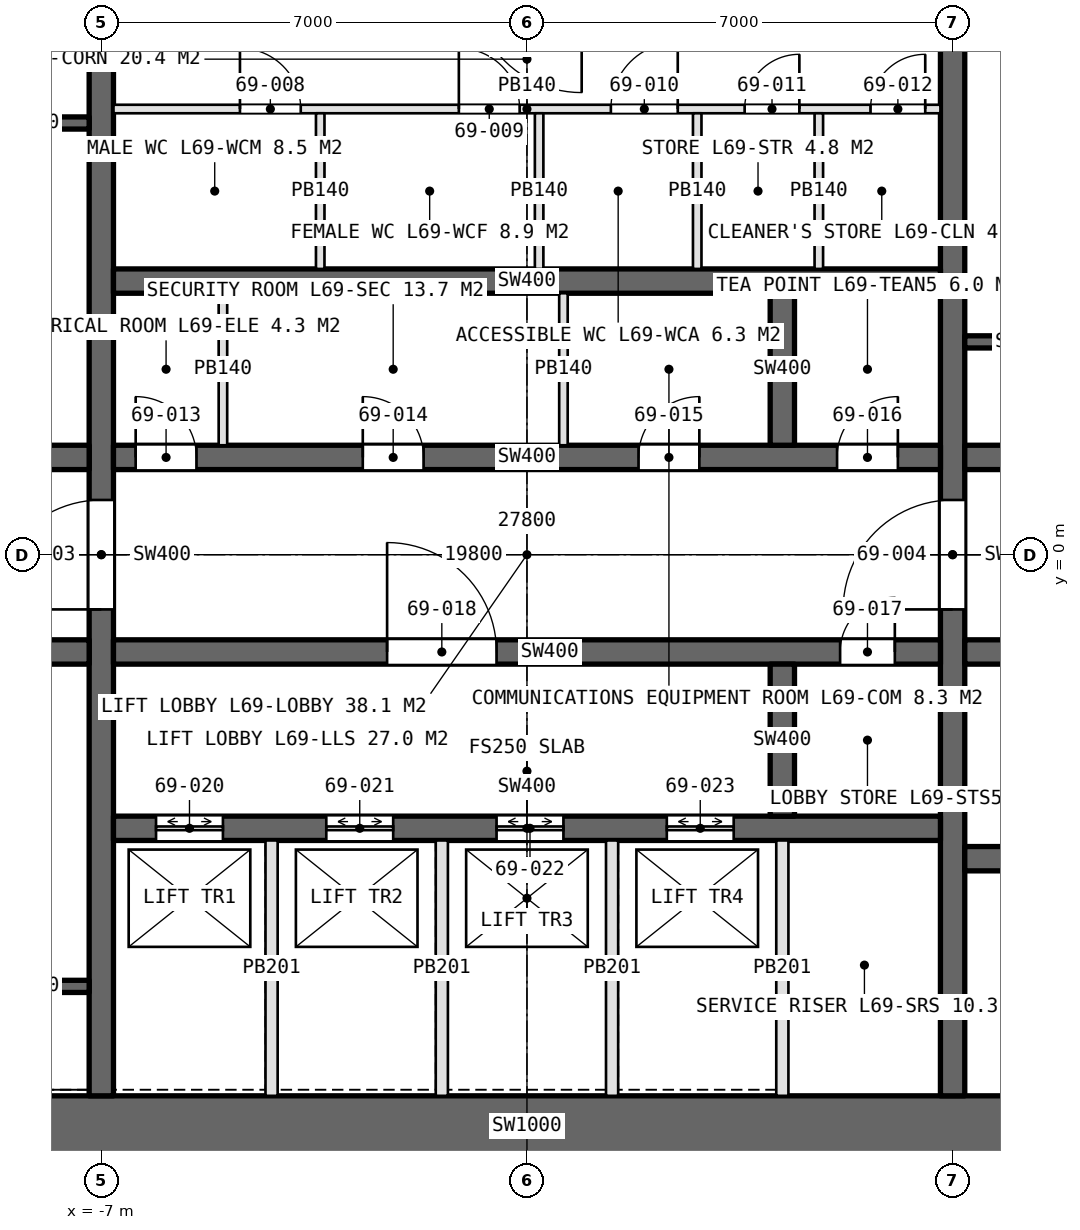
"""IFC4 building model, lengths in metres.
Left out: names, types, materials, properties, quantities, classifications, styles, units other than length and angle.
Written with IfcOpenShell. Run it as: python <this file> out.ifc"""

import sys

from ifc_helpers import new_model, si_unit, direction, frame, frame_2d, origin, place, context, subcontext, project, spatial, rectangle, extrude, element, fill, save


model = new_model("IFC4")
c1 = context("Model", 3, precision=1e-05, world=origin(), true_north=direction((0.0, 1.0)))
c2 = subcontext(c1, "Body", "Model", "MODEL_VIEW")
j1 = project(units=[si_unit("LENGTHUNIT", "METRE"), si_unit("PLANEANGLEUNIT", "RADIAN")], contexts=[c1])
p1 = place(None, origin())
s1 = spatial("IfcSite", under=j1, at=p1, CompositionType="ELEMENT")
p2 = place(p1, origin())
s2 = spatial("IfcBuilding", under=s1, at=p2, CompositionType="ELEMENT")
p3 = place(p2, frame((0.0, 0.0, 309.0)))
s3 = spatial("IfcBuildingStorey", under=s2, at=p3, CompositionType="ELEMENT", Elevation=309.0)
p4 = place(p3, frame((-13.9, -9.4, 0.0), z_axis=(0.0, 0.0, 1.0), x_axis=(1.0, 0.0, 0.0)))
e1 = element("IfcWall", 1, at=p4, inside=s3, PredefinedType="SHEAR", context=c2, shape_type="SweptSolid", body=[
    extrude(rectangle(XDim=27.8, YDim=1.0, at=frame_2d((13.9, 0.0))), origin(), (0.0, 0.0, 1.0), 4.2),
])
p5 = place(p4, frame((22.95, 0.0, 0.0)))
e2 = element("IfcOpeningElement", 2, at=p5, cuts=e1, PredefinedType="OPENING", context=c2, shape_type="SweptSolid", body=[
    extrude(rectangle(XDim=2.2, YDim=2.7, at=frame_2d((1.1, 1.35))), frame((0.0, 0.51, 0.0), z_axis=(0.0, -1.0, 0.0), x_axis=(1.0, 0.0, 0.0)), (0.0, 0.0, 1.0), 1.02),
])
p6 = place(p3, frame((-7.0, -8.9, 0.0), z_axis=(0.0, 0.0, 1.0), x_axis=(0.0, 1.0, 0.0)))
e3 = element("IfcWall", 3, at=p6, inside=s3, PredefinedType="SHEAR", context=c2, shape_type="SweptSolid", body=[
    extrude(rectangle(XDim=17.8, YDim=0.4, at=frame_2d((8.9, 0.0))), origin(), (0.0, 0.0, 1.0), 4.2),
])
p7 = place(p6, frame((8.0, 0.0, 0.0)))
e4 = element("IfcOpeningElement", 4, at=p7, cuts=e3, PredefinedType="OPENING", context=c2, shape_type="SweptSolid", body=[
    extrude(rectangle(XDim=1.8, YDim=2.4, at=frame_2d((0.9, 1.2))), frame((0.0, 0.21, 0.0), z_axis=(0.0, -1.0, 0.0), x_axis=(1.0, 0.0, 0.0)), (0.0, 0.0, 1.0), 0.42),
])
p8 = place(p3, frame((7.0, -8.9, 0.0), z_axis=(0.0, 0.0, 1.0), x_axis=(0.0, 1.0, 0.0)))
e5 = element("IfcWall", 5, at=p8, inside=s3, PredefinedType="SHEAR", context=c2, shape_type="SweptSolid", body=[
    extrude(rectangle(XDim=17.8, YDim=0.4, at=frame_2d((8.9, 0.0))), origin(), (0.0, 0.0, 1.0), 4.2),
])
p9 = place(p8, frame((8.0, 0.0, 0.0)))
e6 = element("IfcOpeningElement", 6, at=p9, cuts=e5, PredefinedType="OPENING", context=c2, shape_type="SweptSolid", body=[
    extrude(rectangle(XDim=1.8, YDim=2.4, at=frame_2d((0.9, 1.2))), frame((0.0, 0.21, 0.0), z_axis=(0.0, -1.0, 0.0), x_axis=(1.0, 0.0, 0.0)), (0.0, 0.0, 1.0), 0.42),
])
p10 = place(p3, frame((-6.8, 1.6, 0.0), z_axis=(0.0, 0.0, 1.0), x_axis=(1.0, 0.0, 0.0)))
e7 = element("IfcWall", 7, at=p10, inside=s3, PredefinedType="SHEAR", context=c2, shape_type="SweptSolid", body=[
    extrude(rectangle(XDim=13.6, YDim=0.4, at=frame_2d((6.8, 0.0))), origin(), (0.0, 0.0, 1.0), 4.2),
])
p11 = place(p10, frame((0.365, 0.0, 0.0)))
e8 = element("IfcOpeningElement", 8, at=p11, cuts=e7, PredefinedType="OPENING", context=c2, shape_type="SweptSolid", body=[
    extrude(rectangle(XDim=1.0, YDim=2.4, at=frame_2d((0.5, 1.2))), frame((0.0, 0.21, 0.0), z_axis=(0.0, -1.0, 0.0), x_axis=(1.0, 0.0, 0.0)), (0.0, 0.0, 1.0), 0.42),
])
p12 = place(p10, frame((4.1, 0.0, 0.0)))
e9 = element("IfcOpeningElement", 9, at=p12, cuts=e7, PredefinedType="OPENING", context=c2, shape_type="SweptSolid", body=[
    extrude(rectangle(XDim=1.0, YDim=2.4, at=frame_2d((0.5, 1.2))), frame((0.0, 0.21, 0.0), z_axis=(0.0, -1.0, 0.0), x_axis=(1.0, 0.0, 0.0)), (0.0, 0.0, 1.0), 0.42),
])
p13 = place(p10, frame((8.635, 0.0, 0.0)))
e10 = element("IfcOpeningElement", 10, at=p13, cuts=e7, PredefinedType="OPENING", context=c2, shape_type="SweptSolid", body=[
    extrude(rectangle(XDim=1.0, YDim=2.4, at=frame_2d((0.5, 1.2))), frame((0.0, 0.21, 0.0), z_axis=(0.0, -1.0, 0.0), x_axis=(1.0, 0.0, 0.0)), (0.0, 0.0, 1.0), 0.42),
])
p14 = place(p10, frame((11.9, 0.0, 0.0)))
e11 = element("IfcOpeningElement", 11, at=p14, cuts=e7, PredefinedType="OPENING", context=c2, shape_type="SweptSolid", body=[
    extrude(rectangle(XDim=1.0, YDim=2.4, at=frame_2d((0.5, 1.2))), frame((0.0, 0.21, 0.0), z_axis=(0.0, -1.0, 0.0), x_axis=(1.0, 0.0, 0.0)), (0.0, 0.0, 1.0), 0.42),
])
p15 = place(p3, frame((-6.8, -1.6, 0.0), z_axis=(0.0, 0.0, 1.0), x_axis=(1.0, 0.0, 0.0)))
e12 = element("IfcWall", 12, at=p15, inside=s3, PredefinedType="SHEAR", context=c2, shape_type="SweptSolid", body=[
    extrude(rectangle(XDim=13.6, YDim=0.4, at=frame_2d((6.8, 0.0))), origin(), (0.0, 0.0, 1.0), 4.2),
])
p16 = place(p15, frame((11.95, 0.0, 0.0)))
e13 = element("IfcOpeningElement", 13, at=p16, cuts=e12, PredefinedType="OPENING", context=c2, shape_type="SweptSolid", body=[
    extrude(rectangle(XDim=0.9, YDim=2.4, at=frame_2d((0.45, 1.2))), frame((0.0, 0.21, 0.0), z_axis=(0.0, -1.0, 0.0), x_axis=(1.0, 0.0, 0.0)), (0.0, 0.0, 1.0), 0.42),
])
p17 = place(p15, frame((4.5, 0.0, 0.0)))
e14 = element("IfcOpeningElement", 14, at=p17, cuts=e12, PredefinedType="OPENING", context=c2, shape_type="SweptSolid", body=[
    extrude(rectangle(XDim=1.8, YDim=2.4, at=frame_2d((0.9, 1.2))), frame((0.0, 0.21, 0.0), z_axis=(0.0, -1.0, 0.0), x_axis=(1.0, 0.0, 0.0)), (0.0, 0.0, 1.0), 0.42),
])
p18 = place(p3, frame((-6.8, 4.5, 0.0), z_axis=(0.0, 0.0, 1.0), x_axis=(1.0, 0.0, 0.0)))
e15 = element("IfcWall", 15, at=p18, inside=s3, PredefinedType="SHEAR", context=c2, shape_type="SweptSolid", body=[
    extrude(rectangle(XDim=13.6, YDim=0.4, at=frame_2d((6.8, 0.0))), origin(), (0.0, 0.0, 1.0), 4.2),
])
p19 = place(p3, frame((-6.8, -4.5, 0.0), z_axis=(0.0, 0.0, 1.0), x_axis=(1.0, 0.0, 0.0)))
e16 = element("IfcWall", 16, at=p19, inside=s3, PredefinedType="SHEAR", context=c2, shape_type="SweptSolid", body=[
    extrude(rectangle(XDim=13.6, YDim=0.4, at=frame_2d((6.8, 0.0))), origin(), (0.0, 0.0, 1.0), 4.2),
])
p20 = place(p19, frame((0.7, 0.0, 0.0)))
e17 = element("IfcOpeningElement", 17, at=p20, cuts=e16, PredefinedType="OPENING", context=c2, shape_type="SweptSolid", body=[
    extrude(rectangle(XDim=1.1, YDim=2.4, at=frame_2d((0.55, 1.2))), frame((0.0, 0.21, 0.0), z_axis=(0.0, -1.0, 0.0), x_axis=(1.0, 0.0, 0.0)), (0.0, 0.0, 1.0), 0.42),
])
p21 = place(p19, frame((3.5, 0.0, 0.0)))
e18 = element("IfcOpeningElement", 18, at=p21, cuts=e16, PredefinedType="OPENING", context=c2, shape_type="SweptSolid", body=[
    extrude(rectangle(XDim=1.1, YDim=2.4, at=frame_2d((0.55, 1.2))), frame((0.0, 0.21, 0.0), z_axis=(0.0, -1.0, 0.0), x_axis=(1.0, 0.0, 0.0)), (0.0, 0.0, 1.0), 0.42),
])
p22 = place(p19, frame((6.3, 0.0, 0.0)))
e19 = element("IfcOpeningElement", 19, at=p22, cuts=e16, PredefinedType="OPENING", context=c2, shape_type="SweptSolid", body=[
    extrude(rectangle(XDim=1.1, YDim=2.4, at=frame_2d((0.55, 1.2))), frame((0.0, 0.21, 0.0), z_axis=(0.0, -1.0, 0.0), x_axis=(1.0, 0.0, 0.0)), (0.0, 0.0, 1.0), 0.42),
])
p23 = place(p19, frame((9.1, 0.0, 0.0)))
e20 = element("IfcOpeningElement", 20, at=p23, cuts=e16, PredefinedType="OPENING", context=c2, shape_type="SweptSolid", body=[
    extrude(rectangle(XDim=1.1, YDim=2.4, at=frame_2d((0.55, 1.2))), frame((0.0, 0.21, 0.0), z_axis=(0.0, -1.0, 0.0), x_axis=(1.0, 0.0, 0.0)), (0.0, 0.0, 1.0), 0.42),
])
for number, where, z_axis, x_axis in (
    (21, (-12.9, 1.6, 0.0), (0.0, 0.0, 1.0), (1.0, 0.0, 0.0)),
    (22, (-12.9, -1.6, 0.0), (0.0, 0.0, 1.0), (1.0, 0.0, 0.0)),
):
    element("IfcWall", number, at=place(p3, frame(where, z_axis=z_axis, x_axis=x_axis)), inside=s3, PredefinedType="SHEAR", context=c2, shape_type="SweptSolid", body=[
        extrude(rectangle(XDim=5.7, YDim=0.4, at=frame_2d((2.85, 0.0))), origin(), (0.0, 0.0, 1.0), 4.2),
    ])
p24 = place(p3, frame((7.2, 1.6, 0.0), z_axis=(0.0, 0.0, 1.0), x_axis=(1.0, 0.0, 0.0)))
e23 = element("IfcWall", 23, at=p24, inside=s3, PredefinedType="SHEAR", context=c2, shape_type="SweptSolid", body=[
    extrude(rectangle(XDim=5.7, YDim=0.4, at=frame_2d((2.85, 0.0))), origin(), (0.0, 0.0, 1.0), 4.2),
])
p25 = place(p24, frame((0.7, 0.0, 0.0)))
e24 = element("IfcOpeningElement", 24, at=p25, cuts=e23, PredefinedType="OPENING", context=c2, shape_type="SweptSolid", body=[
    extrude(rectangle(XDim=1.0, YDim=2.4, at=frame_2d((0.5, 1.2))), frame((0.0, 0.21, 0.0), z_axis=(0.0, -1.0, 0.0), x_axis=(1.0, 0.0, 0.0)), (0.0, 0.0, 1.0), 0.42),
])
p26 = place(p3, frame((7.2, -1.6, 0.0), z_axis=(0.0, 0.0, 1.0), x_axis=(1.0, 0.0, 0.0)))
e25 = element("IfcWall", 25, at=p26, inside=s3, PredefinedType="SHEAR", context=c2, shape_type="SweptSolid", body=[
    extrude(rectangle(XDim=5.7, YDim=0.4, at=frame_2d((2.85, 0.0))), origin(), (0.0, 0.0, 1.0), 4.2),
])
p27 = place(p26, frame((0.9, 0.0, 0.0)))
e26 = element("IfcOpeningElement", 26, at=p27, cuts=e25, PredefinedType="OPENING", context=c2, shape_type="SweptSolid", body=[
    extrude(rectangle(XDim=1.3, YDim=2.4, at=frame_2d((0.65, 1.2))), frame((0.0, 0.21, 0.0), z_axis=(0.0, -1.0, 0.0), x_axis=(1.0, 0.0, 0.0)), (0.0, 0.0, 1.0), 0.42),
])
p28 = place(p26, frame((3.95, 0.0, 0.0)))
e27 = element("IfcOpeningElement", 27, at=p28, cuts=e25, PredefinedType="OPENING", context=c2, shape_type="SweptSolid", body=[
    extrude(rectangle(XDim=1.3, YDim=2.4, at=frame_2d((0.65, 1.2))), frame((0.0, 0.21, 0.0), z_axis=(0.0, -1.0, 0.0), x_axis=(1.0, 0.0, 0.0)), (0.0, 0.0, 1.0), 0.42),
])
p29 = place(p3, frame((7.2, -5.0, 0.0), z_axis=(0.0, 0.0, 1.0), x_axis=(1.0, 0.0, 0.0)))
e28 = element("IfcWall", 28, at=p29, inside=s3, PredefinedType="SHEAR", context=c2, shape_type="SweptSolid", body=[
    extrude(rectangle(XDim=5.7, YDim=0.4, at=frame_2d((2.85, 0.0))), origin(), (0.0, 0.0, 1.0), 4.2),
])
for number, where, z_axis, x_axis in (
    (29, (4.2, 1.8, 0.0), (0.0, 0.0, 1.0), (0.0, 1.0, 0.0)),
    (30, (4.2, -4.3, 0.0), (0.0, 0.0, 1.0), (0.0, 1.0, 0.0)),
):
    element("IfcWall", number, at=place(p3, frame(where, z_axis=z_axis, x_axis=x_axis)), inside=s3, PredefinedType="SHEAR", context=c2, shape_type="SweptSolid", body=[
        extrude(rectangle(XDim=2.5, YDim=0.4, at=frame_2d((1.25, 0.0))), origin(), (0.0, 0.0, 1.0), 4.2),
    ])
p30 = place(p3, frame((-6.8, 7.33, 0.0), z_axis=(0.0, 0.0, 1.0), x_axis=(1.0, 0.0, 0.0)))
e31 = element("IfcWall", 31, at=p30, inside=s3, PredefinedType="PARTITIONING", context=c2, shape_type="SweptSolid", body=[
    extrude(rectangle(XDim=13.6, YDim=0.14, at=frame_2d((6.8, 0.0))), origin(), (0.0, 0.0, 1.0), 3.95),
])
p31 = place(p30, frame((2.08, 0.0, 0.0)))
e32 = element("IfcOpeningElement", 32, at=p31, cuts=e31, PredefinedType="OPENING", context=c2, shape_type="SweptSolid", body=[
    extrude(rectangle(XDim=1.0, YDim=2.4, at=frame_2d((0.5, 1.2))), frame((0.0, 0.08, 0.0), z_axis=(0.0, -1.0, 0.0), x_axis=(1.0, 0.0, 0.0)), (0.0, 0.0, 1.0), 0.16),
])
p32 = place(p30, frame((5.68, 0.0, 0.0)))
e33 = element("IfcOpeningElement", 33, at=p32, cuts=e31, PredefinedType="OPENING", context=c2, shape_type="SweptSolid", body=[
    extrude(rectangle(XDim=1.0, YDim=2.4, at=frame_2d((0.5, 1.2))), frame((0.0, 0.08, 0.0), z_axis=(0.0, -1.0, 0.0), x_axis=(1.0, 0.0, 0.0)), (0.0, 0.0, 1.0), 0.16),
])
p33 = place(p30, frame((8.18, 0.0, 0.0)))
e34 = element("IfcOpeningElement", 34, at=p33, cuts=e31, PredefinedType="OPENING", context=c2, shape_type="SweptSolid", body=[
    extrude(rectangle(XDim=1.1, YDim=2.4, at=frame_2d((0.55, 1.2))), frame((0.0, 0.08, 0.0), z_axis=(0.0, -1.0, 0.0), x_axis=(1.0, 0.0, 0.0)), (0.0, 0.0, 1.0), 0.16),
])
p34 = place(p30, frame((10.38, 0.0, 0.0)))
e35 = element("IfcOpeningElement", 35, at=p34, cuts=e31, PredefinedType="OPENING", context=c2, shape_type="SweptSolid", body=[
    extrude(rectangle(XDim=0.9, YDim=2.4, at=frame_2d((0.45, 1.2))), frame((0.0, 0.08, 0.0), z_axis=(0.0, -1.0, 0.0), x_axis=(1.0, 0.0, 0.0)), (0.0, 0.0, 1.0), 0.16),
])
p35 = place(p30, frame((12.45, 0.0, 0.0)))
e36 = element("IfcOpeningElement", 36, at=p35, cuts=e31, PredefinedType="OPENING", context=c2, shape_type="SweptSolid", body=[
    extrude(rectangle(XDim=0.9, YDim=2.4, at=frame_2d((0.45, 1.2))), frame((0.0, 0.08, 0.0), z_axis=(0.0, -1.0, 0.0), x_axis=(1.0, 0.0, 0.0)), (0.0, 0.0, 1.0), 0.16),
])
for number, where, z_axis, x_axis in (
    (37, (-3.4, 4.7, 0.0), (0.0, 0.0, 1.0), (0.0, 1.0, 0.0)),
    (38, (0.2, 4.7, 0.0), (0.0, 0.0, 1.0), (0.0, 1.0, 0.0)),
    (39, (2.8, 4.7, 0.0), (0.0, 0.0, 1.0), (0.0, 1.0, 0.0)),
    (40, (4.8, 4.7, 0.0), (0.0, 0.0, 1.0), (0.0, 1.0, 0.0)),
):
    element("IfcWall", number, at=place(p3, frame(where, z_axis=z_axis, x_axis=x_axis)), inside=s3, PredefinedType="PARTITIONING", context=c2, shape_type="SweptSolid", body=[
        extrude(rectangle(XDim=2.56, YDim=0.14, at=frame_2d((1.28, 0.0))), origin(), (0.0, 0.0, 1.0), 3.95),
    ])
for number, where, z_axis, x_axis in (
    (41, (-5.0, 1.8, 0.0), (0.0, 0.0, 1.0), (0.0, 1.0, 0.0)),
    (42, (0.6, 1.8, 0.0), (0.0, 0.0, 1.0), (0.0, 1.0, 0.0)),
):
    element("IfcWall", number, at=place(p3, frame(where, z_axis=z_axis, x_axis=x_axis)), inside=s3, PredefinedType="PARTITIONING", context=c2, shape_type="SweptSolid", body=[
        extrude(rectangle(XDim=2.5, YDim=0.14, at=frame_2d((1.25, 0.0))), origin(), (0.0, 0.0, 1.0), 3.95),
    ])
for number, where, z_axis, x_axis in (
    (43, (-4.2, -4.7, 0.0), (0.0, 0.0, 1.0), (0.0, -1.0, 0.0)),
    (44, (-1.4, -4.7, 0.0), (0.0, 0.0, 1.0), (0.0, -1.0, 0.0)),
    (45, (1.4, -4.7, 0.0), (0.0, 0.0, 1.0), (0.0, -1.0, 0.0)),
    (46, (4.2, -4.7, 0.0), (0.0, 0.0, 1.0), (0.0, -1.0, 0.0)),
):
    element("IfcWall", number, at=place(p3, frame(where, z_axis=z_axis, x_axis=x_axis)), inside=s3, PredefinedType="PARTITIONING", context=c2, shape_type="SweptSolid", body=[
        extrude(rectangle(XDim=4.2, YDim=0.2, at=frame_2d((2.1, 0.0))), origin(), (0.0, 0.0, 1.0), 4.2),
    ])
for number, where, z_axis, x_axis in (
    (47, (-9.15, 7.1, 0.0), (0.0, 0.0, 1.0), (1.0, 0.0, 0.0)),
    (48, (-9.15, -7.1, 0.0), (0.0, 0.0, 1.0), (1.0, 0.0, 0.0)),
    (49, (9.15, 3.5, 0.0), (0.0, 0.0, 1.0), (-1.0, 0.0, 0.0)),
):
    element("IfcWall", number, at=place(p3, frame(where, z_axis=z_axis, x_axis=x_axis)), inside=s3, PredefinedType="SOLIDWALL", context=c2, shape_type="SweptSolid", body=[
        extrude(rectangle(XDim=1.95, YDim=0.2, at=frame_2d((0.975, 0.0))), origin(), (0.0, 0.0, 1.0), 4.2),
    ])
p36 = place(p7, origin())
e50 = element("IfcDoor", 50, at=p36, inside=s3, OperationType="DOUBLE_DOOR_SINGLE_SWING", PredefinedType="DOOR", context=c2, shape_type="SweptSolid", body=[
    extrude(rectangle(XDim=1.8, YDim=2.4, at=frame_2d((0.9, 1.2))), frame((0.0, 0.025, 0.0), z_axis=(0.0, -1.0, 0.0), x_axis=(1.0, 0.0, 0.0)), (0.0, 0.0, 1.0), 0.05),
])
fill(e4, e50)
p37 = place(p9, origin())
e51 = element("IfcDoor", 51, at=p37, inside=s3, OperationType="DOUBLE_DOOR_SINGLE_SWING", PredefinedType="DOOR", context=c2, shape_type="SweptSolid", body=[
    extrude(rectangle(XDim=1.8, YDim=2.4, at=frame_2d((0.9, 1.2))), frame((0.0, 0.025, 0.0), z_axis=(0.0, -1.0, 0.0), x_axis=(1.0, 0.0, 0.0)), (0.0, 0.0, 1.0), 0.05),
])
fill(e6, e51)
p38 = place(p31, origin())
e52 = element("IfcDoor", 52, at=p38, inside=s3, OperationType="SINGLE_SWING_LEFT", PredefinedType="DOOR", context=c2, shape_type="SweptSolid", body=[
    extrude(rectangle(XDim=1.0, YDim=2.4, at=frame_2d((0.5, 1.2))), frame((0.0, 0.025, 0.0), z_axis=(0.0, -1.0, 0.0), x_axis=(1.0, 0.0, 0.0)), (0.0, 0.0, 1.0), 0.05),
])
fill(e32, e52)
p39 = place(p32, origin())
e53 = element("IfcDoor", 53, at=p39, inside=s3, OperationType="SINGLE_SWING_LEFT", PredefinedType="DOOR", context=c2, shape_type="SweptSolid", body=[
    extrude(rectangle(XDim=1.0, YDim=2.4, at=frame_2d((0.5, 1.2))), frame((0.0, 0.025, 0.0), z_axis=(0.0, -1.0, 0.0), x_axis=(1.0, 0.0, 0.0)), (0.0, 0.0, 1.0), 0.05),
])
fill(e33, e53)
p40 = place(p33, origin())
e54 = element("IfcDoor", 54, at=p40, inside=s3, OperationType="SINGLE_SWING_RIGHT", PredefinedType="DOOR", context=c2, shape_type="SweptSolid", body=[
    extrude(rectangle(XDim=1.1, YDim=2.4, at=frame_2d((0.55, 1.2))), frame((0.0, 0.025, 0.0), z_axis=(0.0, -1.0, 0.0), x_axis=(1.0, 0.0, 0.0)), (0.0, 0.0, 1.0), 0.05),
])
fill(e34, e54)
p41 = place(p34, origin())
e55 = element("IfcDoor", 55, at=p41, inside=s3, OperationType="SINGLE_SWING_RIGHT", PredefinedType="DOOR", context=c2, shape_type="SweptSolid", body=[
    extrude(rectangle(XDim=0.9, YDim=2.4, at=frame_2d((0.45, 1.2))), frame((0.0, 0.025, 0.0), z_axis=(0.0, -1.0, 0.0), x_axis=(1.0, 0.0, 0.0)), (0.0, 0.0, 1.0), 0.05),
])
fill(e35, e55)
p42 = place(p35, origin())
e56 = element("IfcDoor", 56, at=p42, inside=s3, OperationType="SINGLE_SWING_RIGHT", PredefinedType="DOOR", context=c2, shape_type="SweptSolid", body=[
    extrude(rectangle(XDim=0.9, YDim=2.4, at=frame_2d((0.45, 1.2))), frame((0.0, 0.025, 0.0), z_axis=(0.0, -1.0, 0.0), x_axis=(1.0, 0.0, 0.0)), (0.0, 0.0, 1.0), 0.05),
])
fill(e36, e56)
p43 = place(p11, origin())
e57 = element("IfcDoor", 57, at=p43, inside=s3, OperationType="SINGLE_SWING_LEFT", PredefinedType="DOOR", context=c2, shape_type="SweptSolid", body=[
    extrude(rectangle(XDim=1.0, YDim=2.4, at=frame_2d((0.5, 1.2))), frame((0.0, 0.025, 0.0), z_axis=(0.0, -1.0, 0.0), x_axis=(1.0, 0.0, 0.0)), (0.0, 0.0, 1.0), 0.05),
])
fill(e8, e57)
p44 = place(p12, origin())
e58 = element("IfcDoor", 58, at=p44, inside=s3, OperationType="SINGLE_SWING_LEFT", PredefinedType="DOOR", context=c2, shape_type="SweptSolid", body=[
    extrude(rectangle(XDim=1.0, YDim=2.4, at=frame_2d((0.5, 1.2))), frame((0.0, 0.025, 0.0), z_axis=(0.0, -1.0, 0.0), x_axis=(1.0, 0.0, 0.0)), (0.0, 0.0, 1.0), 0.05),
])
fill(e9, e58)
p45 = place(p13, origin())
e59 = element("IfcDoor", 59, at=p45, inside=s3, OperationType="SINGLE_SWING_RIGHT", PredefinedType="DOOR", context=c2, shape_type="SweptSolid", body=[
    extrude(rectangle(XDim=1.0, YDim=2.4, at=frame_2d((0.5, 1.2))), frame((0.0, 0.025, 0.0), z_axis=(0.0, -1.0, 0.0), x_axis=(1.0, 0.0, 0.0)), (0.0, 0.0, 1.0), 0.05),
])
fill(e10, e59)
p46 = place(p14, origin())
e60 = element("IfcDoor", 60, at=p46, inside=s3, OperationType="SINGLE_SWING_RIGHT", PredefinedType="DOOR", context=c2, shape_type="SweptSolid", body=[
    extrude(rectangle(XDim=1.0, YDim=2.4, at=frame_2d((0.5, 1.2))), frame((0.0, 0.025, 0.0), z_axis=(0.0, -1.0, 0.0), x_axis=(1.0, 0.0, 0.0)), (0.0, 0.0, 1.0), 0.05),
])
fill(e11, e60)
p47 = place(p16, origin())
e61 = element("IfcDoor", 61, at=p47, inside=s3, OperationType="SINGLE_SWING_RIGHT", PredefinedType="DOOR", context=c2, shape_type="SweptSolid", body=[
    extrude(rectangle(XDim=0.9, YDim=2.4, at=frame_2d((0.45, 1.2))), frame((0.0, 0.025, 0.0), z_axis=(0.0, -1.0, 0.0), x_axis=(1.0, 0.0, 0.0)), (0.0, 0.0, 1.0), 0.05),
])
fill(e13, e61)
p48 = place(p17, origin())
e62 = element("IfcDoor", 62, at=p48, inside=s3, OperationType="DOUBLE_DOOR_SINGLE_SWING", PredefinedType="DOOR", context=c2, shape_type="SweptSolid", body=[
    extrude(rectangle(XDim=1.8, YDim=2.4, at=frame_2d((0.9, 1.2))), frame((0.0, 0.025, 0.0), z_axis=(0.0, -1.0, 0.0), x_axis=(1.0, 0.0, 0.0)), (0.0, 0.0, 1.0), 0.05),
])
fill(e14, e62)
p49 = place(p20, origin())
e63 = element("IfcDoor", 63, at=p49, inside=s3, OperationType="DOUBLE_DOOR_SLIDING", PredefinedType="DOOR", context=c2, shape_type="SweptSolid", body=[
    extrude(rectangle(XDim=1.1, YDim=2.4, at=frame_2d((0.55, 1.2))), frame((0.0, 0.025, 0.0), z_axis=(0.0, -1.0, 0.0), x_axis=(1.0, 0.0, 0.0)), (0.0, 0.0, 1.0), 0.05),
])
fill(e17, e63)
p50 = place(p21, origin())
e64 = element("IfcDoor", 64, at=p50, inside=s3, OperationType="DOUBLE_DOOR_SLIDING", PredefinedType="DOOR", context=c2, shape_type="SweptSolid", body=[
    extrude(rectangle(XDim=1.1, YDim=2.4, at=frame_2d((0.55, 1.2))), frame((0.0, 0.025, 0.0), z_axis=(0.0, -1.0, 0.0), x_axis=(1.0, 0.0, 0.0)), (0.0, 0.0, 1.0), 0.05),
])
fill(e18, e64)
p51 = place(p22, origin())
e65 = element("IfcDoor", 65, at=p51, inside=s3, OperationType="DOUBLE_DOOR_SLIDING", PredefinedType="DOOR", context=c2, shape_type="SweptSolid", body=[
    extrude(rectangle(XDim=1.1, YDim=2.4, at=frame_2d((0.55, 1.2))), frame((0.0, 0.025, 0.0), z_axis=(0.0, -1.0, 0.0), x_axis=(1.0, 0.0, 0.0)), (0.0, 0.0, 1.0), 0.05),
])
fill(e19, e65)
p52 = place(p23, origin())
e66 = element("IfcDoor", 66, at=p52, inside=s3, OperationType="DOUBLE_DOOR_SLIDING", PredefinedType="DOOR", context=c2, shape_type="SweptSolid", body=[
    extrude(rectangle(XDim=1.1, YDim=2.4, at=frame_2d((0.55, 1.2))), frame((0.0, 0.025, 0.0), z_axis=(0.0, -1.0, 0.0), x_axis=(1.0, 0.0, 0.0)), (0.0, 0.0, 1.0), 0.05),
])
fill(e20, e66)
save(model, sys.argv[1])
